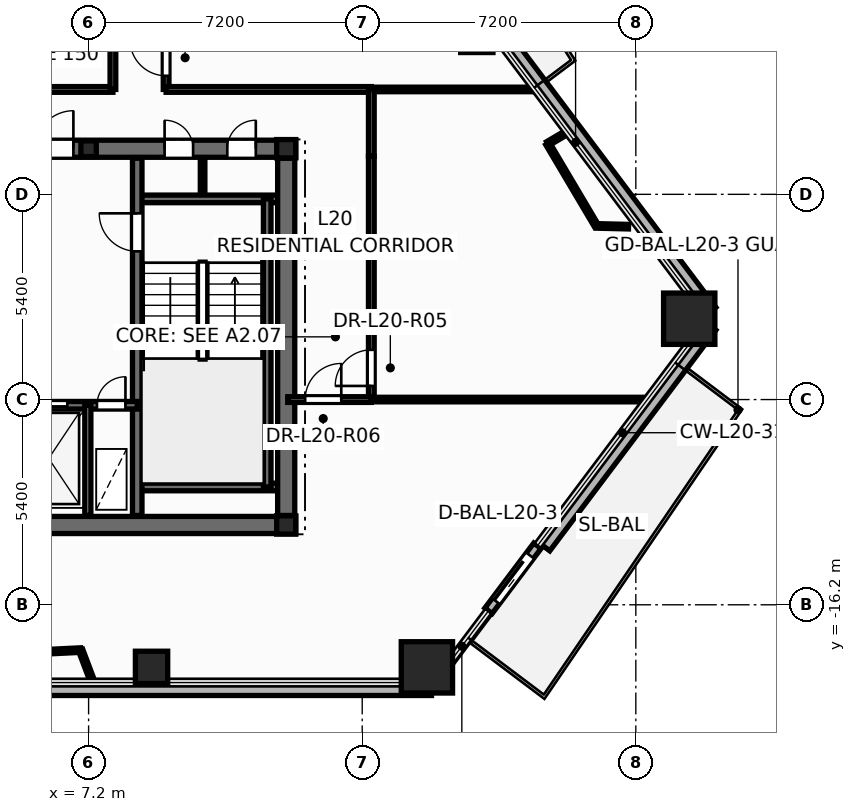
"""IFC4 building model, lengths in metres.
Left out: names, types, materials, properties, quantities, classifications, styles, units other than length and angle.
Written with IfcOpenShell. Run it as: python <this file> out.ifc"""

import sys

from ifc_helpers import new_model, si_unit, direction, frame, frame_2d, origin, origin_2d, place, context, subcontext, project, spatial, rectangle, hollow_rectangle, hollow_circle, i_section, extrude, element, fill, save


model = new_model("IFC4")
c1 = context("Model", 3, precision=1e-05, world=origin(), true_north=direction((0.0, 1.0)))
c2 = subcontext(c1, "Body", "Model", "MODEL_VIEW")
j1 = project(units=[si_unit("LENGTHUNIT", "METRE"), si_unit("PLANEANGLEUNIT", "RADIAN")], contexts=[c1])
p1 = place(None, origin())
s1 = spatial("IfcSite", under=j1, at=p1, CompositionType="ELEMENT")
p2 = place(p1, origin())
s2 = spatial("IfcBuilding", under=s1, at=p2, CompositionType="ELEMENT")
p3 = place(p2, frame((0.0, 0.0, 79.2)))
s3 = spatial("IfcBuildingStorey", under=s2, at=p3, CompositionType="ELEMENT", Elevation=79.2)
for number, where, z_axis, x_axis in (
    (1, (16.103, -17.847, 0.0), (0.0, 0.0, 1.0), (1.0, 0.0, 0.0)),
    (2, (23.005, -8.673, 0.0), (0.0, 0.0, 1.0), (1.0, 0.0, 0.0)),
):
    element("IfcColumn", number, at=place(p3, frame(where, z_axis=z_axis, x_axis=x_axis)), inside=s3, PredefinedType="COLUMN", context=c2, shape_type="SweptSolid", body=[
        extrude(hollow_rectangle(XDim=1.35, YDim=1.35, WallThickness=0.065, at=origin_2d()), origin(), (0.0, 0.0, 1.0), 3.6),
    ])
for number, where, z_axis, x_axis in (
    (3, (8.856, -17.847, 0.0), (0.0, 0.0, 1.0), (1.0, 0.0, 0.0)),
    (4, (17.416, -1.244, 0.0), (0.0, 0.0, 1.0), (1.0, 0.0, 0.0)),
):
    element("IfcColumn", number, at=place(p3, frame(where, z_axis=z_axis, x_axis=x_axis)), inside=s3, PredefinedType="COLUMN", context=c2, shape_type="SweptSolid", body=[
        extrude(hollow_circle(Radius=0.425, WallThickness=0.038, at=origin_2d()), origin(), (0.0, 0.0, 1.0), 3.6),
    ])
for number, where, z_axis, x_axis in (
    (5, (12.4, -14.1, 0.0), (0.0, 0.0, 1.0), (1.0, 0.0, 0.0)),
    (6, (12.4, -4.2, 0.0), (0.0, 0.0, 1.0), (1.0, 0.0, 0.0)),
):
    element("IfcColumn", number, at=place(p3, frame(where, z_axis=z_axis, x_axis=x_axis)), inside=s3, PredefinedType="COLUMN", context=c2, shape_type="SweptSolid", body=[
        extrude(i_section(OverallWidth=0.5, OverallDepth=0.482, WebThickness=0.04, FlangeThickness=0.045, at=origin_2d()), origin(), (0.0, 0.0, 1.0), 3.6),
    ])
p4 = place(p3, frame((7.2, -4.2, 0.0), z_axis=(0.0, 0.0, 1.0), x_axis=(1.0, 0.0, 0.0)))
e7 = element("IfcColumn", 7, at=p4, inside=s3, PredefinedType="PILASTER", context=c2, shape_type="SweptSolid", body=[
    extrude(i_section(OverallWidth=0.405, OverallDepth=0.414, WebThickness=0.022, FlangeThickness=0.032, at=origin_2d()), origin(), (0.0, 0.0, 1.0), 3.6),
])
p5 = place(p3, frame((-16.222, -18.407, -0.2), z_axis=(0.0, 0.0, 1.0), x_axis=(1.0, 0.0, 0.0)))
e8 = element("IfcWall", 8, at=p5, inside=s3, PredefinedType="PARAPET", context=c2, shape_type="SweptSolid", body=[
    extrude(rectangle(XDim=32.444, YDim=0.36, at=frame_2d((16.222, 0.0))), origin(), (0.0, 0.0, 1.0), 0.38),
])
p6 = place(p3, frame((19.192, -14.672, -0.2), z_axis=(0.0, 0.0, 1.0), x_axis=(0.601262309509, 0.799051709944, 0.0)))
e9 = element("IfcWall", 9, at=p6, inside=s3, PredefinedType="PARAPET", context=c2, shape_type="SweptSolid", body=[
    extrude(rectangle(XDim=7.268, YDim=0.36, at=frame_2d((3.634, 0.0))), origin(), (0.0, 0.0, 1.0), 0.38),
])
p7 = place(p3, frame((23.562, -8.481, -0.2), z_axis=(0.0, 0.0, 1.0), x_axis=(-0.601239151346, 0.799069135237, 0.0)))
e10 = element("IfcWall", 10, at=p7, inside=s3, PredefinedType="PARAPET", context=c2, shape_type="SweptSolid", body=[
    extrude(rectangle(XDim=11.373, YDim=0.36, at=frame_2d((5.687, 0.0))), origin(), (0.0, 0.0, 1.0), 0.38),
])
p8 = place(p3, frame((17.723, -16.358, -0.015), z_axis=(0.0, 0.0, 1.0), x_axis=(0.601240548581, 0.799068083921, 0.0)))
e11 = element("IfcWall", 11, at=p8, inside=s3, PredefinedType="STANDARD", context=c2, shape_type="SweptSolid", body=[
    extrude(rectangle(XDim=2.14, YDim=0.24, at=frame_2d((1.07, 0.0))), origin(), (0.0, 0.0, 1.0), 2.728),
])
p9 = place(p8, frame((0.32, 0.0, 0.015)))
e12 = element("IfcOpeningElement", 12, at=p9, cuts=e11, PredefinedType="OPENING", context=c2, shape_type="SweptSolid", body=[
    extrude(rectangle(XDim=1.506, YDim=2.204, at=frame_2d((0.75, 1.102))), frame((0.0, 0.13, 0.0), z_axis=(0.0, -1.0, 0.0), x_axis=(1.0, 0.0, 0.0)), (0.0, 0.0, 1.0), 0.26),
])
p10 = place(p3, frame((10.2, -5.52, 0.0), z_axis=(0.0, 0.0, 1.0), x_axis=(0.0, 1.0, 0.0)))
e13 = element("IfcWall", 13, at=p10, inside=s3, PredefinedType="PARTITIONING", context=c2, shape_type="SweptSolid", body=[
    extrude(rectangle(XDim=1.12, YDim=0.12, at=frame_2d((0.56, 0.0))), origin(), (0.0, 0.0, 1.0), 3.35),
])
p11 = place(p3, frame((-12.65, -14.1, 0.0), z_axis=(0.0, 0.0, 1.0), x_axis=(1.0, 0.0, 0.0)))
e14 = element("IfcWall", 14, at=p11, inside=s3, PredefinedType="SHEAR", context=c2, shape_type="SweptSolid", body=[
    extrude(rectangle(XDim=25.3, YDim=0.45, at=frame_2d((12.65, 0.0))), origin(), (0.0, 0.0, 1.0), 3.6),
])
p12 = place(p3, frame((-12.65, -4.2, 0.0), z_axis=(0.0, 0.0, 1.0), x_axis=(1.0, 0.0, 0.0)))
e15 = element("IfcWall", 15, at=p12, inside=s3, PredefinedType="SHEAR", context=c2, shape_type="SweptSolid", body=[
    extrude(rectangle(XDim=25.3, YDim=0.45, at=frame_2d((12.65, 0.0))), origin(), (0.0, 0.0, 1.0), 3.6),
])
p13 = place(p12, frame((0.95, 0.0, 0.0)))
e16 = element("IfcOpeningElement", 16, at=p13, cuts=e15, PredefinedType="OPENING", context=c2, shape_type="SweptSolid", body=[
    extrude(rectangle(XDim=0.756, YDim=2.054, at=frame_2d((0.375, 1.027))), frame((0.0, 0.235, 0.0), z_axis=(0.0, -1.0, 0.0), x_axis=(1.0, 0.0, 0.0)), (0.0, 0.0, 1.0), 0.47),
])
p14 = place(p12, frame((2.6, 0.0, 0.0)))
e17 = element("IfcOpeningElement", 17, at=p14, cuts=e15, PredefinedType="OPENING", context=c2, shape_type="SweptSolid", body=[
    extrude(rectangle(XDim=0.756, YDim=2.054, at=frame_2d((0.375, 1.027))), frame((0.0, 0.235, 0.0), z_axis=(0.0, -1.0, 0.0), x_axis=(1.0, 0.0, 0.0)), (0.0, 0.0, 1.0), 0.47),
])
p15 = place(p12, frame((21.85, 0.0, 0.0)))
e18 = element("IfcOpeningElement", 18, at=p15, cuts=e15, PredefinedType="OPENING", context=c2, shape_type="SweptSolid", body=[
    extrude(rectangle(XDim=0.756, YDim=2.054, at=frame_2d((0.375, 1.027))), frame((0.0, 0.235, 0.0), z_axis=(0.0, -1.0, 0.0), x_axis=(1.0, 0.0, 0.0)), (0.0, 0.0, 1.0), 0.47),
])
p16 = place(p12, frame((23.5, 0.0, 0.0)))
e19 = element("IfcOpeningElement", 19, at=p16, cuts=e15, PredefinedType="OPENING", context=c2, shape_type="SweptSolid", body=[
    extrude(rectangle(XDim=0.756, YDim=2.054, at=frame_2d((0.375, 1.027))), frame((0.0, 0.235, 0.0), z_axis=(0.0, -1.0, 0.0), x_axis=(1.0, 0.0, 0.0)), (0.0, 0.0, 1.0), 0.47),
])
p17 = place(p12, frame((5.85, 0.0, 0.0)))
e20 = element("IfcOpeningElement", 20, at=p17, cuts=e15, PredefinedType="OPENING", context=c2, shape_type="SweptSolid", body=[
    extrude(rectangle(XDim=1.006, YDim=2.104, at=frame_2d((0.5, 1.052))), frame((0.0, 0.235, 0.0), z_axis=(0.0, -1.0, 0.0), x_axis=(1.0, 0.0, 0.0)), (0.0, 0.0, 1.0), 0.47),
])
p18 = place(p12, frame((10.35, 0.0, 0.0)))
e21 = element("IfcOpeningElement", 21, at=p18, cuts=e15, PredefinedType="OPENING", context=c2, shape_type="SweptSolid", body=[
    extrude(rectangle(XDim=1.406, YDim=2.154, at=frame_2d((0.7, 1.077))), frame((0.0, 0.235, 0.0), z_axis=(0.0, -1.0, 0.0), x_axis=(1.0, 0.0, 0.0)), (0.0, 0.0, 1.0), 0.47),
])
p19 = place(p12, frame((18.45, 0.0, 0.0)))
e22 = element("IfcOpeningElement", 22, at=p19, cuts=e15, PredefinedType="OPENING", context=c2, shape_type="SweptSolid", body=[
    extrude(rectangle(XDim=1.006, YDim=2.104, at=frame_2d((0.5, 1.052))), frame((0.0, 0.235, 0.0), z_axis=(0.0, -1.0, 0.0), x_axis=(1.0, 0.0, 0.0)), (0.0, 0.0, 1.0), 0.47),
])
for number, where, z_axis, x_axis in (
    (23, (8.48, -5.52, 0.0), (0.0, 0.0, 1.0), (1.0, 0.0, 0.0)),
    (24, (8.48, -13.1, 0.0), (0.0, 0.0, 1.0), (1.0, 0.0, 0.0)),
):
    element("IfcWall", number, at=place(p3, frame(where, z_axis=z_axis, x_axis=x_axis)), inside=s3, PredefinedType="SOLIDWALL", context=c2, shape_type="SweptSolid", body=[
        extrude(rectangle(XDim=3.87, YDim=0.2, at=frame_2d((1.935, 0.0))), origin(), (0.0, 0.0, 1.0), 3.6),
    ])
p20 = place(p3, frame((11.9, -13.1, 0.0), z_axis=(0.0, 0.0, 1.0), x_axis=(0.0, 1.0, 0.0)))
e25 = element("IfcWall", 25, at=p20, inside=s3, PredefinedType="SOLIDWALL", context=c2, shape_type="SweptSolid", body=[
    extrude(rectangle(XDim=7.58, YDim=0.2, at=frame_2d((3.79, 0.0))), origin(), (0.0, 0.0, 1.0), 3.6),
])
p21 = place(p3, frame((8.48, -13.85, 0.0), z_axis=(0.0, 0.0, 1.0), x_axis=(0.0, 1.0, 0.0)))
e26 = element("IfcWall", 26, at=p21, inside=s3, PredefinedType="SHEAR", context=c2, shape_type="SweptSolid", body=[
    extrude(rectangle(XDim=9.4, YDim=0.25, at=frame_2d((4.7, 0.0))), origin(), (0.0, 0.0, 1.0), 3.6),
])
p22 = place(p21, frame((6.95, 0.0, 0.0)))
e27 = element("IfcOpeningElement", 27, at=p22, cuts=e26, PredefinedType="OPENING", context=c2, shape_type="SweptSolid", body=[
    extrude(rectangle(XDim=1.006, YDim=2.104, at=frame_2d((0.5, 1.052))), frame((0.0, 0.135, 0.0), z_axis=(0.0, -1.0, 0.0), x_axis=(1.0, 0.0, 0.0)), (0.0, 0.0, 1.0), 0.27),
])
p23 = place(p3, frame((5.12, -10.95, 0.0), z_axis=(0.0, 0.0, 1.0), x_axis=(1.0, 0.0, 0.0)))
e28 = element("IfcWall", 28, at=p23, inside=s3, PredefinedType="SOLIDWALL", context=c2, shape_type="SweptSolid", body=[
    extrude(rectangle(XDim=3.36, YDim=0.2, at=frame_2d((1.68, 0.0))), origin(), (0.0, 0.0, 1.0), 3.6),
])
p24 = place(p23, frame((0.42, 0.0, 0.0)))
e29 = element("IfcOpeningElement", 29, at=p24, cuts=e28, PredefinedType="OPENING", context=c2, shape_type="SweptSolid", body=[
    extrude(rectangle(XDim=1.106, YDim=2.104, at=frame_2d((0.55, 1.052))), frame((0.0, 0.11, 0.0), z_axis=(0.0, -1.0, 0.0), x_axis=(1.0, 0.0, 0.0)), (0.0, 0.0, 1.0), 0.22),
])
p25 = place(p23, frame((2.3, 0.0, 0.0)))
e30 = element("IfcOpeningElement", 30, at=p25, cuts=e28, PredefinedType="OPENING", context=c2, shape_type="SweptSolid", body=[
    extrude(rectangle(XDim=0.756, YDim=2.054, at=frame_2d((0.375, 1.027))), frame((0.0, 0.11, 0.0), z_axis=(0.0, -1.0, 0.0), x_axis=(1.0, 0.0, 0.0)), (0.0, 0.0, 1.0), 0.22),
])
p26 = place(p3, frame((7.18, -13.85, 0.0), z_axis=(0.0, 0.0, 1.0), x_axis=(0.0, 1.0, 0.0)))
e31 = element("IfcWall", 31, at=p26, inside=s3, PredefinedType="PARTITIONING", context=c2, shape_type="SweptSolid", body=[
    extrude(rectangle(XDim=2.9, YDim=0.16, at=frame_2d((1.45, 0.0))), origin(), (0.0, 0.0, 1.0), 2.375),
])
p27 = place(p3, frame((12.4, -13.85, 0.0), z_axis=(0.0, 0.0, 1.0), x_axis=(0.0, 1.0, 0.0)))
e32 = element("IfcWall", 32, at=p27, inside=s3, PredefinedType="SHEAR", context=c2, shape_type="SweptSolid", body=[
    extrude(rectangle(XDim=9.4, YDim=0.45, at=frame_2d((4.7, 0.0))), origin(), (0.0, 0.0, 1.0), 3.6),
])
p28 = place(p3, frame((-5.32, -2.64, 0.0), z_axis=(0.0, 0.0, 1.0), x_axis=(1.0, 0.0, 0.0)))
e33 = element("IfcWall", 33, at=p28, inside=s3, PredefinedType="PARTITIONING", context=c2, shape_type="SweptSolid", body=[
    extrude(rectangle(XDim=13.16, YDim=0.15, at=frame_2d((6.58, 0.0))), origin(), (0.0, 0.0, 1.0), 2.325),
])
p29 = place(p28, frame((0.439, 0.0, 0.0)))
e34 = element("IfcOpeningElement", 34, at=p29, cuts=e33, PredefinedType="OPENING", context=c2, shape_type="SweptSolid", body=[
    extrude(rectangle(XDim=0.956, YDim=2.104, at=frame_2d((0.475, 1.052))), frame((0.0, 0.085, 0.0), z_axis=(0.0, -1.0, 0.0), x_axis=(1.0, 0.0, 0.0)), (0.0, 0.0, 1.0), 0.17),
])
p30 = place(p3, frame((9.24, -2.64, 0.0), z_axis=(0.0, 0.0, 1.0), x_axis=(0.0, 1.0, 0.0)))
e35 = element("IfcWall", 35, at=p30, inside=s3, PredefinedType="PARTITIONING", context=c2, shape_type="SweptSolid", body=[
    extrude(rectangle(XDim=8.84, YDim=0.15, at=frame_2d((4.42, 0.0))), origin(), (0.0, 0.0, 1.0), 2.325),
])
p31 = place(p30, frame((0.359, 0.0, 0.0)))
e36 = element("IfcOpeningElement", 36, at=p31, cuts=e35, PredefinedType="OPENING", context=c2, shape_type="SweptSolid", body=[
    extrude(rectangle(XDim=0.956, YDim=2.104, at=frame_2d((0.475, 1.052))), frame((0.0, 0.085, 0.0), z_axis=(0.0, -1.0, 0.0), x_axis=(1.0, 0.0, 0.0)), (0.0, 0.0, 1.0), 0.17),
])
p32 = place(p3, frame((14.64, -10.8, 0.0), z_axis=(0.0, 0.0, 1.0), x_axis=(1.0, 0.0, 0.0)))
e37 = element("IfcWall", 37, at=p32, inside=s3, PredefinedType="PARTITIONING", context=c2, shape_type="SweptSolid", body=[
    extrude(rectangle(XDim=7.265, YDim=0.12, at=frame_2d((3.633, 0.0))), origin(), (0.0, 0.0, 1.0), 2.713),
])
p33 = place(p3, frame((14.64, -10.8, 0.0), z_axis=(0.0, 0.0, 1.0), x_axis=(0.0, 1.0, 0.0)))
e38 = element("IfcWall", 38, at=p33, inside=s3, PredefinedType="PARTITIONING", context=c2, shape_type="SweptSolid", body=[
    extrude(rectangle(XDim=6.4, YDim=0.15, at=frame_2d((3.2, 0.0))), origin(), (0.0, 0.0, 1.0), 2.325),
])
p34 = place(p33, frame((0.359, 0.0, 0.0)))
e39 = element("IfcOpeningElement", 39, at=p34, cuts=e38, PredefinedType="OPENING", context=c2, shape_type="SweptSolid", body=[
    extrude(rectangle(XDim=0.956, YDim=2.104, at=frame_2d((0.475, 1.052))), frame((0.0, 0.085, 0.0), z_axis=(0.0, -1.0, 0.0), x_axis=(1.0, 0.0, 0.0)), (0.0, 0.0, 1.0), 0.17),
])
p35 = place(p3, frame((9.24, -2.64, 0.0), z_axis=(0.0, 0.0, 1.0), x_axis=(1.0, 0.0, 0.0)))
e40 = element("IfcWall", 40, at=p35, inside=s3, PredefinedType="PARTITIONING", context=c2, shape_type="SweptSolid", body=[
    extrude(rectangle(XDim=5.4, YDim=0.15, at=frame_2d((2.7, 0.0))), origin(), (0.0, 0.0, 1.0), 3.35),
])
p36 = place(p3, frame((14.64, -2.64, 0.0), z_axis=(0.0, 0.0, 1.0), x_axis=(1.0, 0.0, 0.0)))
e41 = element("IfcWall", 41, at=p36, inside=s3, PredefinedType="PARTITIONING", context=c2, shape_type="SweptSolid", body=[
    extrude(rectangle(XDim=4.327, YDim=0.12, at=frame_2d((2.163, 0.0))), origin(), (0.0, 0.0, 1.0), 2.713),
])
p37 = place(p3, frame((7.84, -2.64, 0.0), z_axis=(0.0, 0.0, 1.0), x_axis=(0.0, 1.0, 0.0)))
e42 = element("IfcWall", 42, at=p37, inside=s3, PredefinedType="PARTITIONING", context=c2, shape_type="SweptSolid", body=[
    extrude(rectangle(XDim=7.5, YDim=0.15, at=frame_2d((3.75, 0.0))), origin(), (0.0, 0.0, 1.0), 2.325),
])
p38 = place(p3, frame((2.749, -17.599, 0.0), z_axis=(0.0, 0.0, 1.0), x_axis=(0.998813238234, 0.048704364582, 0.0)))
e43 = element("IfcWall", 43, at=p38, inside=s3, PredefinedType="PARTITIONING", context=c2, shape_type="SweptSolid", body=[
    extrude(rectangle(XDim=4.246, YDim=0.12, at=frame_2d((2.123, 0.0))), origin(), (0.0, 0.0, 1.0), 3.35),
])
p39 = place(p3, frame((12.44, -10.8, 0.0), z_axis=(0.0, 0.0, 1.0), x_axis=(1.0, 0.0, 0.0)))
e44 = element("IfcWall", 44, at=p39, inside=s3, PredefinedType="PARTITIONING", context=c2, shape_type="SweptSolid", body=[
    extrude(rectangle(XDim=2.2, YDim=0.15, at=frame_2d((1.1, 0.0))), origin(), (0.0, 0.0, 1.0), 2.713),
])
p40 = place(p39, frame((0.459, 0.0, 0.0)))
e45 = element("IfcOpeningElement", 45, at=p40, cuts=e44, PredefinedType="OPENING", context=c2, shape_type="SweptSolid", body=[
    extrude(rectangle(XDim=0.956, YDim=2.104, at=frame_2d((0.475, 1.052))), frame((0.0, 0.085, 0.0), z_axis=(0.0, -1.0, 0.0), x_axis=(1.0, 0.0, 0.0)), (0.0, 0.0, 1.0), 0.17),
])
p41 = place(p3, frame((20.565, -6.231, 0.0), z_axis=(0.0, 0.0, 1.0), x_axis=(-0.509892834718, 0.860237930519, 0.0)))
e46 = element("IfcWall", 46, at=p41, inside=s3, PredefinedType="PARTITIONING", context=c2, shape_type="SweptSolid", body=[
    extrude(rectangle(XDim=2.516, YDim=0.12, at=frame_2d((1.258, 0.0))), origin(), (0.0, 0.0, 1.0), 3.35),
])
p42 = place(p3, frame((14.64, -4.4, 0.0), z_axis=(0.0, 0.0, 1.0), x_axis=(0.0, 1.0, 0.0)))
e47 = element("IfcWall", 47, at=p42, inside=s3, PredefinedType="PARTITIONING", context=c2, shape_type="SweptSolid", body=[
    extrude(rectangle(XDim=1.76, YDim=0.15, at=frame_2d((0.88, 0.0))), origin(), (0.0, 0.0, 1.0), 3.35),
])
p43 = place(p3, frame((6.99, -17.392, 0.0), z_axis=(0.0, 0.0, 1.0), x_axis=(0.353757918281, -0.935337016937, 0.0)))
e48 = element("IfcWall", 48, at=p43, inside=s3, PredefinedType="PARTITIONING", context=c2, shape_type="SweptSolid", body=[
    extrude(rectangle(XDim=0.903, YDim=0.12, at=frame_2d((0.452, 0.0))), origin(), (0.0, 0.0, 1.0), 2.713),
])
p44 = place(p3, frame((21.408, -6.251, 0.0), z_axis=(0.0, 0.0, 1.0), x_axis=(-0.999718148135, 0.023740772704, 0.0)))
e49 = element("IfcWall", 49, at=p44, inside=s3, PredefinedType="PARTITIONING", context=c2, shape_type="SweptSolid", body=[
    extrude(rectangle(XDim=0.843, YDim=0.12, at=frame_2d((0.422, 0.0))), origin(), (0.0, 0.0, 1.0), 2.713),
])
p45 = place(p3, frame((19.282, -4.067, 0.0), z_axis=(0.0, 0.0, 1.0), x_axis=(0.86021213122, 0.50993635809, 0.0)))
e50 = element("IfcWall", 50, at=p45, inside=s3, PredefinedType="PARTITIONING", context=c2, shape_type="SweptSolid", body=[
    extrude(rectangle(XDim=0.599, YDim=0.12, at=frame_2d((0.3, 0.0))), origin(), (0.0, 0.0, 1.0), 2.713),
])
p46 = place(p9, origin())
e51 = element("IfcDoor", 51, at=p46, inside=s3, OperationType="SLIDING_TO_RIGHT", PredefinedType="DOOR", context=c2, shape_type="SweptSolid", body=[
    extrude(rectangle(XDim=1.5, YDim=2.2, at=frame_2d((0.75, 1.1))), frame((0.0, 0.025, 0.0), z_axis=(0.0, -1.0, 0.0), x_axis=(1.0, 0.0, 0.0)), (0.0, 0.0, 1.0), 0.05),
])
fill(e12, e51)
p47 = place(p22, origin())
e52 = element("IfcDoor", 52, at=p47, inside=s3, OperationType="SINGLE_SWING_RIGHT", PredefinedType="DOOR", context=c2, shape_type="SweptSolid", body=[
    extrude(rectangle(XDim=1.0, YDim=2.1, at=frame_2d((0.5, 1.05))), frame((0.0, 0.025, 0.0), z_axis=(0.0, -1.0, 0.0), x_axis=(1.0, 0.0, 0.0)), (0.0, 0.0, 1.0), 0.05),
])
fill(e27, e52)
p48 = place(p24, origin())
e53 = element("IfcDoor", 53, at=p48, inside=s3, OperationType="DOUBLE_DOOR_SLIDING", PredefinedType="DOOR", context=c2, shape_type="SweptSolid", body=[
    extrude(rectangle(XDim=1.1, YDim=2.1, at=frame_2d((0.55, 1.05))), frame((0.0, 0.025, 0.0), z_axis=(0.0, -1.0, 0.0), x_axis=(1.0, 0.0, 0.0)), (0.0, 0.0, 1.0), 0.05),
])
fill(e29, e53)
p49 = place(p25, origin())
e54 = element("IfcDoor", 54, at=p49, inside=s3, OperationType="SINGLE_SWING_RIGHT", PredefinedType="DOOR", context=c2, shape_type="SweptSolid", body=[
    extrude(rectangle(XDim=0.75, YDim=2.05, at=frame_2d((0.375, 1.025))), frame((0.0, 0.025, 0.0), z_axis=(0.0, -1.0, 0.0), x_axis=(1.0, 0.0, 0.0)), (0.0, 0.0, 1.0), 0.05),
])
fill(e30, e54)
p50 = place(p15, origin())
e55 = element("IfcDoor", 55, at=p50, inside=s3, OperationType="SINGLE_SWING_LEFT", PredefinedType="DOOR", context=c2, shape_type="SweptSolid", body=[
    extrude(rectangle(XDim=0.75, YDim=2.05, at=frame_2d((0.375, 1.025))), frame((0.0, 0.025, 0.0), z_axis=(0.0, -1.0, 0.0), x_axis=(1.0, 0.0, 0.0)), (0.0, 0.0, 1.0), 0.05),
])
fill(e18, e55)
p51 = place(p16, origin())
e56 = element("IfcDoor", 56, at=p51, inside=s3, OperationType="SINGLE_SWING_RIGHT", PredefinedType="DOOR", context=c2, shape_type="SweptSolid", body=[
    extrude(rectangle(XDim=0.75, YDim=2.05, at=frame_2d((0.375, 1.025))), frame((0.0, 0.025, 0.0), z_axis=(0.0, -1.0, 0.0), x_axis=(1.0, 0.0, 0.0)), (0.0, 0.0, 1.0), 0.05),
])
fill(e19, e56)
p52 = place(p19, origin())
e57 = element("IfcDoor", 57, at=p52, inside=s3, OperationType="SINGLE_SWING_RIGHT", PredefinedType="DOOR", context=c2, shape_type="SweptSolid", body=[
    extrude(rectangle(XDim=1.0, YDim=2.1, at=frame_2d((0.5, 1.05))), frame((0.0, 0.025, 0.0), z_axis=(0.0, -1.0, 0.0), x_axis=(1.0, 0.0, 0.0)), (0.0, 0.0, 1.0), 0.05),
])
fill(e22, e57)
p53 = place(p34, origin())
e58 = element("IfcDoor", 58, at=p53, inside=s3, OperationType="SINGLE_SWING_LEFT", PredefinedType="DOOR", context=c2, shape_type="SweptSolid", body=[
    extrude(rectangle(XDim=0.95, YDim=2.1, at=frame_2d((0.475, 1.05))), frame((0.0, 0.025, 0.0), z_axis=(0.0, -1.0, 0.0), x_axis=(1.0, 0.0, 0.0)), (0.0, 0.0, 1.0), 0.05),
])
fill(e39, e58)
p54 = place(p40, origin())
e59 = element("IfcDoor", 59, at=p54, inside=s3, OperationType="SINGLE_SWING_RIGHT", PredefinedType="DOOR", context=c2, shape_type="SweptSolid", body=[
    extrude(rectangle(XDim=0.95, YDim=2.1, at=frame_2d((0.475, 1.05))), frame((0.0, 0.025, 0.0), z_axis=(0.0, -1.0, 0.0), x_axis=(1.0, 0.0, 0.0)), (0.0, 0.0, 1.0), 0.05),
])
fill(e45, e59)
p55 = place(p31, origin())
e60 = element("IfcDoor", 60, at=p55, inside=s3, OperationType="SINGLE_SWING_RIGHT", PredefinedType="DOOR", context=c2, shape_type="SweptSolid", body=[
    extrude(rectangle(XDim=0.95, YDim=2.1, at=frame_2d((0.475, 1.05))), frame((0.0, 0.025, 0.0), z_axis=(0.0, -1.0, 0.0), x_axis=(1.0, 0.0, 0.0)), (0.0, 0.0, 1.0), 0.05),
])
fill(e36, e60)
save(model, sys.argv[1])
